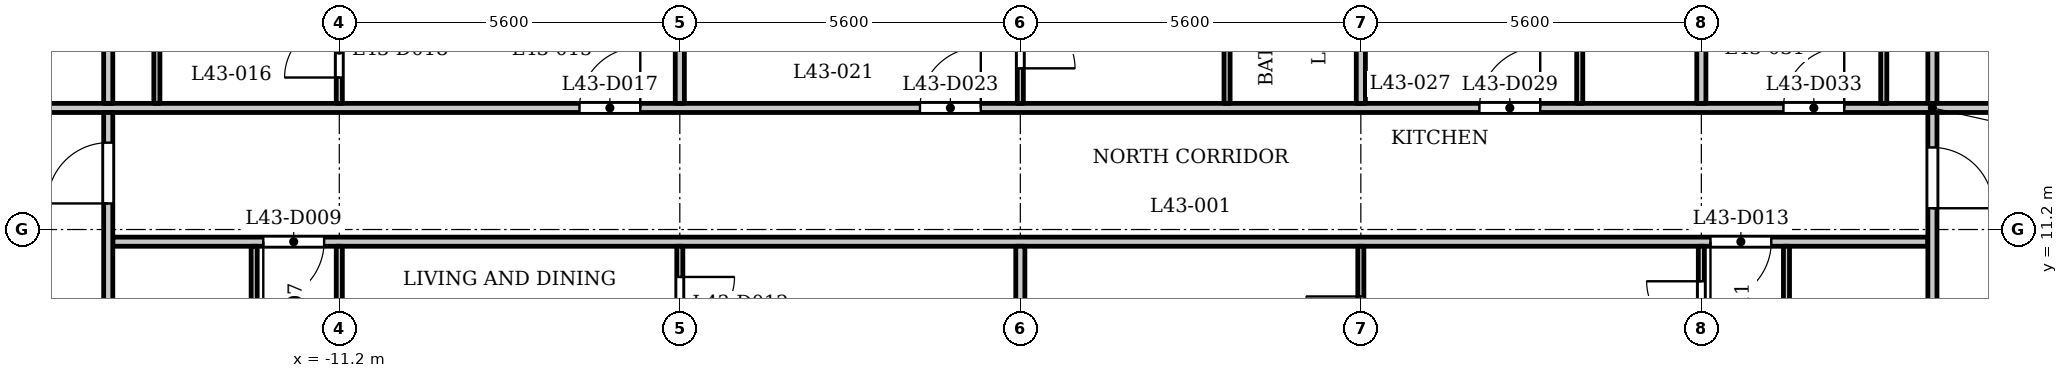
"""IFC4 building model, lengths in metres.
Left out: names, types, materials, properties, quantities, classifications, styles, units other than length and angle.
Written with IfcOpenShell. Run it as: python <this file> out.ifc"""

import sys

from ifc_helpers import new_model, si_unit, direction, frame, frame_2d, origin, place, context, subcontext, project, spatial, rectangle, extrude, element, fill, save


model = new_model("IFC4")
c1 = context("Model", 3, precision=1e-05, world=origin(), true_north=direction((0.0, 1.0)))
c2 = subcontext(c1, "Body", "Model", "MODEL_VIEW")
j1 = project(units=[si_unit("LENGTHUNIT", "METRE"), si_unit("PLANEANGLEUNIT", "RADIAN")], contexts=[c1])
p1 = place(None, origin())
s1 = spatial("IfcSite", under=j1, at=p1, CompositionType="ELEMENT")
p2 = place(p1, origin())
s2 = spatial("IfcBuilding", under=s1, at=p2, CompositionType="ELEMENT")
p3 = place(p2, frame((0.0, 0.0, 167.6)))
s3 = spatial("IfcBuildingStorey", under=s2, at=p3, CompositionType="ELEMENT", Elevation=167.6)
p4 = place(p3, frame((-14.925, 11.0, 0.0), z_axis=(0.0, 0.0, 1.0), x_axis=(1.0, 0.0, 0.0)))
e1 = element("IfcWall", 1, at=p4, inside=s3, PredefinedType="PARTITIONING", context=c2, shape_type="SweptSolid", body=[
    extrude(rectangle(XDim=29.85, YDim=0.15, at=frame_2d((14.925, 0.0))), origin(), (0.0, 0.0, 1.0), 3.2),
])
p5 = place(p4, frame((2.475, 0.0, 0.0)))
e2 = element("IfcOpeningElement", 2, at=p5, cuts=e1, PredefinedType="OPENING", context=c2, shape_type="SweptSolid", body=[
    extrude(rectangle(XDim=1.0, YDim=2.1, at=frame_2d((0.5, 1.05))), frame((0.0, 0.085, 0.0), z_axis=(0.0, -1.0, 0.0), x_axis=(1.0, 0.0, 0.0)), (0.0, 0.0, 1.0), 0.17),
])
p6 = place(p4, frame((26.275, 0.0, 0.0)))
e3 = element("IfcOpeningElement", 3, at=p6, cuts=e1, PredefinedType="OPENING", context=c2, shape_type="SweptSolid", body=[
    extrude(rectangle(XDim=1.0, YDim=2.1, at=frame_2d((0.5, 1.05))), frame((0.0, 0.085, 0.0), z_axis=(0.0, -1.0, 0.0), x_axis=(1.0, 0.0, 0.0)), (0.0, 0.0, 1.0), 0.17),
])
p7 = place(p3, frame((-17.4, 13.2, 0.0), z_axis=(0.0, 0.0, 1.0), x_axis=(1.0, 0.0, 0.0)))
e4 = element("IfcWall", 4, at=p7, inside=s3, PredefinedType="PARTITIONING", context=c2, shape_type="SweptSolid", body=[
    extrude(rectangle(XDim=34.8, YDim=0.15, at=frame_2d((17.4, 0.0))), origin(), (0.0, 0.0, 1.0), 3.2),
])
p8 = place(p7, frame((0.25, 0.0, 0.0)))
e5 = element("IfcOpeningElement", 5, at=p8, cuts=e4, PredefinedType="OPENING", context=c2, shape_type="SweptSolid", body=[
    extrude(rectangle(XDim=1.0, YDim=2.1, at=frame_2d((0.5, 1.05))), frame((0.0, 0.085, 0.0), z_axis=(0.0, -1.0, 0.0), x_axis=(1.0, 0.0, 0.0)), (0.0, 0.0, 1.0), 0.17),
])
p9 = place(p7, frame((33.65, 0.0, 0.0)))
e6 = element("IfcOpeningElement", 6, at=p9, cuts=e4, PredefinedType="OPENING", context=c2, shape_type="SweptSolid", body=[
    extrude(rectangle(XDim=1.0, YDim=2.1, at=frame_2d((0.5, 1.05))), frame((0.0, 0.085, 0.0), z_axis=(0.0, -1.0, 0.0), x_axis=(1.0, 0.0, 0.0)), (0.0, 0.0, 1.0), 0.17),
])
p10 = place(p7, frame((10.15, 0.0, 0.0)))
e7 = element("IfcOpeningElement", 7, at=p10, cuts=e4, PredefinedType="OPENING", context=c2, shape_type="SweptSolid", body=[
    extrude(rectangle(XDim=1.0, YDim=2.1, at=frame_2d((0.5, 1.05))), frame((0.0, 0.085, 0.0), z_axis=(0.0, -1.0, 0.0), x_axis=(1.0, 0.0, 0.0)), (0.0, 0.0, 1.0), 0.17),
])
p11 = place(p7, frame((15.75, 0.0, 0.0)))
e8 = element("IfcOpeningElement", 8, at=p11, cuts=e4, PredefinedType="OPENING", context=c2, shape_type="SweptSolid", body=[
    extrude(rectangle(XDim=1.0, YDim=2.1, at=frame_2d((0.5, 1.05))), frame((0.0, 0.085, 0.0), z_axis=(0.0, -1.0, 0.0), x_axis=(1.0, 0.0, 0.0)), (0.0, 0.0, 1.0), 0.17),
])
p12 = place(p7, frame((24.95, 0.0, 0.0)))
e9 = element("IfcOpeningElement", 9, at=p12, cuts=e4, PredefinedType="OPENING", context=c2, shape_type="SweptSolid", body=[
    extrude(rectangle(XDim=1.0, YDim=2.1, at=frame_2d((0.5, 1.05))), frame((0.0, 0.085, 0.0), z_axis=(0.0, -1.0, 0.0), x_axis=(1.0, 0.0, 0.0)), (0.0, 0.0, 1.0), 0.17),
])
p13 = place(p7, frame((29.95, 0.0, 0.0)))
e10 = element("IfcOpeningElement", 10, at=p13, cuts=e4, PredefinedType="OPENING", context=c2, shape_type="SweptSolid", body=[
    extrude(rectangle(XDim=1.0, YDim=2.1, at=frame_2d((0.5, 1.05))), frame((0.0, 0.085, 0.0), z_axis=(0.0, -1.0, 0.0), x_axis=(1.0, 0.0, 0.0)), (0.0, 0.0, 1.0), 0.17),
])
p14 = place(p3, frame((-15.0, 6.769, 0.0), z_axis=(0.0, 0.0, 1.0), x_axis=(0.0, 1.0, 0.0)))
e11 = element("IfcWall", 11, at=p14, inside=s3, PredefinedType="PARTITIONING", context=c2, shape_type="SweptSolid", body=[
    extrude(rectangle(XDim=6.356, YDim=0.15, at=frame_2d((3.178, 0.0))), origin(), (0.0, 0.0, 1.0), 3.2),
])
p15 = place(p14, frame((4.86, 0.0, 0.0)))
e12 = element("IfcOpeningElement", 12, at=p15, cuts=e11, PredefinedType="OPENING", context=c2, shape_type="SweptSolid", body=[
    extrude(rectangle(XDim=1.0, YDim=2.1, at=frame_2d((0.5, 1.05))), frame((0.0, 0.085, 0.0), z_axis=(0.0, -1.0, 0.0), x_axis=(1.0, 0.0, 0.0)), (0.0, 0.0, 1.0), 0.17),
])
p16 = place(p3, frame((-15.0, 13.275, 0.0), z_axis=(0.0, 0.0, 1.0), x_axis=(0.0, 1.0, 0.0)))
e13 = element("IfcWall", 13, at=p16, inside=s3, PredefinedType="PARTITIONING", context=c2, shape_type="SweptSolid", body=[
    extrude(rectangle(XDim=2.05, YDim=0.15, at=frame_2d((1.025, 0.0))), origin(), (0.0, 0.0, 1.0), 3.2),
])
p17 = place(p3, frame((-14.2, 13.275, 0.0), z_axis=(0.0, 0.0, 1.0), x_axis=(0.0, 1.0, 0.0)))
e14 = element("IfcWall", 14, at=p17, inside=s3, PredefinedType="PARTITIONING", context=c2, shape_type="SweptSolid", body=[
    extrude(rectangle(XDim=3.175, YDim=0.1, at=frame_2d((1.587, 0.0))), origin(), (0.0, 0.0, 1.0), 3.2),
])
p18 = place(p3, frame((-12.6, 7.32, 0.0), z_axis=(0.0, 0.0, 1.0), x_axis=(0.0, 1.0, 0.0)))
e15 = element("IfcWall", 15, at=p18, inside=s3, PredefinedType="PARTITIONING", context=c2, shape_type="SweptSolid", body=[
    extrude(rectangle(XDim=3.605, YDim=0.1, at=frame_2d((1.802, 0.0))), origin(), (0.0, 0.0, 1.0), 3.2),
])
p19 = place(p18, frame((1.729, 0.0, 0.0)))
e16 = element("IfcOpeningElement", 16, at=p19, cuts=e15, PredefinedType="OPENING", context=c2, shape_type="SweptSolid", body=[
    extrude(rectangle(XDim=0.8, YDim=2.1, at=frame_2d((0.4, 1.05))), frame((0.0, 0.06, 0.0), z_axis=(0.0, -1.0, 0.0), x_axis=(1.0, 0.0, 0.0)), (0.0, 0.0, 1.0), 0.12),
])
p20 = place(p3, frame((-11.2, 7.32, 0.0), z_axis=(0.0, 0.0, 1.0), x_axis=(0.0, 1.0, 0.0)))
e17 = element("IfcWall", 17, at=p20, inside=s3, PredefinedType="PARTITIONING", context=c2, shape_type="SweptSolid", body=[
    extrude(rectangle(XDim=3.605, YDim=0.1, at=frame_2d((1.802, 0.0))), origin(), (0.0, 0.0, 1.0), 3.2),
])
p21 = place(p20, frame((1.7, 0.0, 0.0)))
e18 = element("IfcOpeningElement", 18, at=p21, cuts=e17, PredefinedType="OPENING", context=c2, shape_type="SweptSolid", body=[
    extrude(rectangle(XDim=0.9, YDim=2.1, at=frame_2d((0.45, 1.05))), frame((0.0, 0.06, 0.0), z_axis=(0.0, -1.0, 0.0), x_axis=(1.0, 0.0, 0.0)), (0.0, 0.0, 1.0), 0.12),
])
p22 = place(p3, frame((-11.2, 13.275, 0.0), z_axis=(0.0, 0.0, 1.0), x_axis=(0.0, 1.0, 0.0)))
e19 = element("IfcWall", 19, at=p22, inside=s3, PredefinedType="PARTITIONING", context=c2, shape_type="SweptSolid", body=[
    extrude(rectangle(XDim=3.175, YDim=0.1, at=frame_2d((1.587, 0.0))), origin(), (0.0, 0.0, 1.0), 3.2),
])
p23 = place(p22, frame((0.425, 0.0, 0.0)))
e20 = element("IfcOpeningElement", 20, at=p23, cuts=e19, PredefinedType="OPENING", context=c2, shape_type="SweptSolid", body=[
    extrude(rectangle(XDim=0.9, YDim=2.1, at=frame_2d((0.45, 1.05))), frame((0.0, 0.06, 0.0), z_axis=(0.0, -1.0, 0.0), x_axis=(1.0, 0.0, 0.0)), (0.0, 0.0, 1.0), 0.12),
])
p24 = place(p3, frame((-5.6, 7.32, 0.0), z_axis=(0.0, 0.0, 1.0), x_axis=(0.0, 1.0, 0.0)))
e21 = element("IfcWall", 21, at=p24, inside=s3, PredefinedType="PARTITIONING", context=c2, shape_type="SweptSolid", body=[
    extrude(rectangle(XDim=3.605, YDim=0.1, at=frame_2d((1.802, 0.0))), origin(), (0.0, 0.0, 1.0), 3.2),
])
p25 = place(p24, frame((2.2, 0.0, 0.0)))
e22 = element("IfcOpeningElement", 22, at=p25, cuts=e21, PredefinedType="OPENING", context=c2, shape_type="SweptSolid", body=[
    extrude(rectangle(XDim=0.9, YDim=2.1, at=frame_2d((0.45, 1.05))), frame((0.0, 0.06, 0.0), z_axis=(0.0, -1.0, 0.0), x_axis=(1.0, 0.0, 0.0)), (0.0, 0.0, 1.0), 0.12),
])
p26 = place(p3, frame((-5.6, 13.275, 0.0), z_axis=(0.0, 0.0, 1.0), x_axis=(0.0, 1.0, 0.0)))
e23 = element("IfcWall", 23, at=p26, inside=s3, PredefinedType="PARTITIONING", context=c2, shape_type="SweptSolid", body=[
    extrude(rectangle(XDim=3.175, YDim=0.15, at=frame_2d((1.587, 0.0))), origin(), (0.0, 0.0, 1.0), 3.2),
])
p27 = place(p3, frame((0.0, 13.275, 0.0), z_axis=(0.0, 0.0, 1.0), x_axis=(0.0, 1.0, 0.0)))
e24 = element("IfcWall", 24, at=p27, inside=s3, PredefinedType="PARTITIONING", context=c2, shape_type="SweptSolid", body=[
    extrude(rectangle(XDim=3.175, YDim=0.1, at=frame_2d((1.587, 0.0))), origin(), (0.0, 0.0, 1.0), 3.2),
])
p28 = place(p27, frame((0.576, 0.0, 0.0)))
e25 = element("IfcOpeningElement", 25, at=p28, cuts=e24, PredefinedType="OPENING", context=c2, shape_type="SweptSolid", body=[
    extrude(rectangle(XDim=0.9, YDim=2.1, at=frame_2d((0.45, 1.05))), frame((0.0, 0.06, 0.0), z_axis=(0.0, -1.0, 0.0), x_axis=(1.0, 0.0, 0.0)), (0.0, 0.0, 1.0), 0.12),
])
p29 = place(p3, frame((0.0, 7.32, 0.0), z_axis=(0.0, 0.0, 1.0), x_axis=(0.0, 1.0, 0.0)))
e26 = element("IfcWall", 26, at=p29, inside=s3, PredefinedType="PARTITIONING", context=c2, shape_type="SweptSolid", body=[
    extrude(rectangle(XDim=3.605, YDim=0.15, at=frame_2d((1.802, 0.0))), origin(), (0.0, 0.0, 1.0), 3.2),
])
p30 = place(p3, frame((3.4, 13.275, 0.0), z_axis=(0.0, 0.0, 1.0), x_axis=(0.0, 1.0, 0.0)))
e27 = element("IfcWall", 27, at=p30, inside=s3, PredefinedType="PARTITIONING", context=c2, shape_type="SweptSolid", body=[
    extrude(rectangle(XDim=3.175, YDim=0.1, at=frame_2d((1.587, 0.0))), origin(), (0.0, 0.0, 1.0), 3.2),
])
p31 = place(p3, frame((5.6, 7.32, 0.0), z_axis=(0.0, 0.0, 1.0), x_axis=(0.0, 1.0, 0.0)))
e28 = element("IfcWall", 28, at=p31, inside=s3, PredefinedType="PARTITIONING", context=c2, shape_type="SweptSolid", body=[
    extrude(rectangle(XDim=3.605, YDim=0.1, at=frame_2d((1.802, 0.0))), origin(), (0.0, 0.0, 1.0), 3.2),
])
p32 = place(p31, frame((1.879, 0.0, 0.0)))
e29 = element("IfcOpeningElement", 29, at=p32, cuts=e28, PredefinedType="OPENING", context=c2, shape_type="SweptSolid", body=[
    extrude(rectangle(XDim=0.9, YDim=2.1, at=frame_2d((0.45, 1.05))), frame((0.0, 0.06, 0.0), z_axis=(0.0, -1.0, 0.0), x_axis=(1.0, 0.0, 0.0)), (0.0, 0.0, 1.0), 0.12),
])
p33 = place(p3, frame((5.6, 13.275, 0.0), z_axis=(0.0, 0.0, 1.0), x_axis=(0.0, 1.0, 0.0)))
e30 = element("IfcWall", 30, at=p33, inside=s3, PredefinedType="PARTITIONING", context=c2, shape_type="SweptSolid", body=[
    extrude(rectangle(XDim=3.175, YDim=0.15, at=frame_2d((1.587, 0.0))), origin(), (0.0, 0.0, 1.0), 3.2),
])
p34 = place(p3, frame((9.2, 13.275, 0.0), z_axis=(0.0, 0.0, 1.0), x_axis=(0.0, 1.0, 0.0)))
e31 = element("IfcWall", 31, at=p34, inside=s3, PredefinedType="PARTITIONING", context=c2, shape_type="SweptSolid", body=[
    extrude(rectangle(XDim=3.175, YDim=0.1, at=frame_2d((1.587, 0.0))), origin(), (0.0, 0.0, 1.0), 3.2),
])
p35 = place(p3, frame((11.2, 7.32, 0.0), z_axis=(0.0, 0.0, 1.0), x_axis=(0.0, 1.0, 0.0)))
e32 = element("IfcWall", 32, at=p35, inside=s3, PredefinedType="PARTITIONING", context=c2, shape_type="SweptSolid", body=[
    extrude(rectangle(XDim=3.605, YDim=0.1, at=frame_2d((1.802, 0.0))), origin(), (0.0, 0.0, 1.0), 3.2),
])
p36 = place(p35, frame((2.129, 0.0, 0.0)))
e33 = element("IfcOpeningElement", 33, at=p36, cuts=e32, PredefinedType="OPENING", context=c2, shape_type="SweptSolid", body=[
    extrude(rectangle(XDim=0.9, YDim=2.1, at=frame_2d((0.45, 1.05))), frame((0.0, 0.06, 0.0), z_axis=(0.0, -1.0, 0.0), x_axis=(1.0, 0.0, 0.0)), (0.0, 0.0, 1.0), 0.12),
])
p37 = place(p3, frame((11.2, 13.275, 0.0), z_axis=(0.0, 0.0, 1.0), x_axis=(0.0, 1.0, 0.0)))
e34 = element("IfcWall", 34, at=p37, inside=s3, PredefinedType="PARTITIONING", context=c2, shape_type="SweptSolid", body=[
    extrude(rectangle(XDim=3.175, YDim=0.15, at=frame_2d((1.587, 0.0))), origin(), (0.0, 0.0, 1.0), 3.2),
])
p38 = place(p3, frame((12.6, 7.32, 0.0), z_axis=(0.0, 0.0, 1.0), x_axis=(0.0, 1.0, 0.0)))
e35 = element("IfcWall", 35, at=p38, inside=s3, PredefinedType="PARTITIONING", context=c2, shape_type="SweptSolid", body=[
    extrude(rectangle(XDim=3.605, YDim=0.1, at=frame_2d((1.802, 0.0))), origin(), (0.0, 0.0, 1.0), 3.2),
])
p39 = place(p38, frame((1.7, 0.0, 0.0)))
e36 = element("IfcOpeningElement", 36, at=p39, cuts=e35, PredefinedType="OPENING", context=c2, shape_type="SweptSolid", body=[
    extrude(rectangle(XDim=0.8, YDim=2.1, at=frame_2d((0.4, 1.05))), frame((0.0, 0.06, 0.0), z_axis=(0.0, -1.0, 0.0), x_axis=(1.0, 0.0, 0.0)), (0.0, 0.0, 1.0), 0.12),
])
p40 = place(p3, frame((14.2, 13.275, 0.0), z_axis=(0.0, 0.0, 1.0), x_axis=(0.0, 1.0, 0.0)))
e37 = element("IfcWall", 37, at=p40, inside=s3, PredefinedType="PARTITIONING", context=c2, shape_type="SweptSolid", body=[
    extrude(rectangle(XDim=3.175, YDim=0.1, at=frame_2d((1.587, 0.0))), origin(), (0.0, 0.0, 1.0), 3.2),
])
p41 = place(p3, frame((15.0, 6.769, 0.0), z_axis=(0.0, 0.0, 1.0), x_axis=(0.0, 1.0, 0.0)))
e38 = element("IfcWall", 38, at=p41, inside=s3, PredefinedType="PARTITIONING", context=c2, shape_type="SweptSolid", body=[
    extrude(rectangle(XDim=6.356, YDim=0.15, at=frame_2d((3.178, 0.0))), origin(), (0.0, 0.0, 1.0), 3.2),
])
p42 = place(p41, frame((4.781, 0.0, 0.0)))
e39 = element("IfcOpeningElement", 39, at=p42, cuts=e38, PredefinedType="OPENING", context=c2, shape_type="SweptSolid", body=[
    extrude(rectangle(XDim=1.0, YDim=2.1, at=frame_2d((0.5, 1.05))), frame((0.0, 0.085, 0.0), z_axis=(0.0, -1.0, 0.0), x_axis=(1.0, 0.0, 0.0)), (0.0, 0.0, 1.0), 0.17),
])
p43 = place(p3, frame((15.0, 13.275, 0.0), z_axis=(0.0, 0.0, 1.0), x_axis=(0.0, 1.0, 0.0)))
e40 = element("IfcWall", 40, at=p43, inside=s3, PredefinedType="PARTITIONING", context=c2, shape_type="SweptSolid", body=[
    extrude(rectangle(XDim=2.05, YDim=0.15, at=frame_2d((1.025, 0.0))), origin(), (0.0, 0.0, 1.0), 3.2),
])
p44 = place(p15, origin())
e41 = element("IfcDoor", 41, at=p44, inside=s3, OperationType="SINGLE_SWING_RIGHT", PredefinedType="DOOR", context=c2, shape_type="SweptSolid", body=[
    extrude(rectangle(XDim=1.0, YDim=2.1, at=frame_2d((0.5, 1.05))), frame((0.0, 0.025, 0.0), z_axis=(0.0, -1.0, 0.0), x_axis=(1.0, 0.0, 0.0)), (0.0, 0.0, 1.0), 0.05),
])
fill(e12, e41)
p45 = place(p42, origin())
e42 = element("IfcDoor", 42, at=p45, inside=s3, OperationType="SINGLE_SWING_LEFT", PredefinedType="DOOR", context=c2, shape_type="SweptSolid", body=[
    extrude(rectangle(XDim=1.0, YDim=2.1, at=frame_2d((0.5, 1.05))), frame((0.0, 0.025, 0.0), z_axis=(0.0, -1.0, 0.0), x_axis=(1.0, 0.0, 0.0)), (0.0, 0.0, 1.0), 0.05),
])
fill(e39, e42)
p46 = place(p5, origin())
e43 = element("IfcDoor", 43, at=p46, inside=s3, OperationType="SINGLE_SWING_LEFT", PredefinedType="DOOR", context=c2, shape_type="SweptSolid", body=[
    extrude(rectangle(XDim=1.0, YDim=2.1, at=frame_2d((0.5, 1.05))), frame((0.0, 0.025, 0.0), z_axis=(0.0, -1.0, 0.0), x_axis=(1.0, 0.0, 0.0)), (0.0, 0.0, 1.0), 0.05),
])
fill(e2, e43)
p47 = place(p25, origin())
e44 = element("IfcDoor", 44, at=p47, inside=s3, OperationType="SINGLE_SWING_RIGHT", PredefinedType="DOOR", context=c2, shape_type="SweptSolid", body=[
    extrude(rectangle(XDim=0.9, YDim=2.1, at=frame_2d((0.45, 1.05))), frame((0.0, 0.025, 0.0), z_axis=(0.0, -1.0, 0.0), x_axis=(1.0, 0.0, 0.0)), (0.0, 0.0, 1.0), 0.05),
])
fill(e22, e44)
p48 = place(p6, origin())
e45 = element("IfcDoor", 45, at=p48, inside=s3, OperationType="SINGLE_SWING_LEFT", PredefinedType="DOOR", context=c2, shape_type="SweptSolid", body=[
    extrude(rectangle(XDim=1.0, YDim=2.1, at=frame_2d((0.5, 1.05))), frame((0.0, 0.025, 0.0), z_axis=(0.0, -1.0, 0.0), x_axis=(1.0, 0.0, 0.0)), (0.0, 0.0, 1.0), 0.05),
])
fill(e3, e45)
p49 = place(p36, origin())
e46 = element("IfcDoor", 46, at=p49, inside=s3, OperationType="SINGLE_SWING_LEFT", PredefinedType="DOOR", context=c2, shape_type="SweptSolid", body=[
    extrude(rectangle(XDim=0.9, YDim=2.1, at=frame_2d((0.45, 1.05))), frame((0.0, 0.025, 0.0), z_axis=(0.0, -1.0, 0.0), x_axis=(1.0, 0.0, 0.0)), (0.0, 0.0, 1.0), 0.05),
])
fill(e33, e46)
p50 = place(p32, origin())
e47 = element("IfcDoor", 47, at=p50, inside=s3, OperationType="SINGLE_SWING_LEFT", PredefinedType="DOOR", context=c2, shape_type="SweptSolid", body=[
    extrude(rectangle(XDim=0.9, YDim=2.1, at=frame_2d((0.45, 1.05))), frame((0.0, 0.025, 0.0), z_axis=(0.0, -1.0, 0.0), x_axis=(1.0, 0.0, 0.0)), (0.0, 0.0, 1.0), 0.05),
])
fill(e29, e47)
p51 = place(p10, origin())
e48 = element("IfcDoor", 48, at=p51, inside=s3, OperationType="SINGLE_SWING_LEFT", PredefinedType="DOOR", context=c2, shape_type="SweptSolid", body=[
    extrude(rectangle(XDim=1.0, YDim=2.1, at=frame_2d((0.5, 1.05))), frame((0.0, 0.025, 0.0), z_axis=(0.0, -1.0, 0.0), x_axis=(1.0, 0.0, 0.0)), (0.0, 0.0, 1.0), 0.05),
])
fill(e7, e48)
p52 = place(p23, origin())
e49 = element("IfcDoor", 49, at=p52, inside=s3, OperationType="SINGLE_SWING_RIGHT", PredefinedType="DOOR", context=c2, shape_type="SweptSolid", body=[
    extrude(rectangle(XDim=0.9, YDim=2.1, at=frame_2d((0.45, 1.05))), frame((0.0, 0.025, 0.0), z_axis=(0.0, -1.0, 0.0), x_axis=(1.0, 0.0, 0.0)), (0.0, 0.0, 1.0), 0.05),
])
fill(e20, e49)
p53 = place(p11, origin())
e50 = element("IfcDoor", 50, at=p53, inside=s3, OperationType="SINGLE_SWING_LEFT", PredefinedType="DOOR", context=c2, shape_type="SweptSolid", body=[
    extrude(rectangle(XDim=1.0, YDim=2.1, at=frame_2d((0.5, 1.05))), frame((0.0, 0.025, 0.0), z_axis=(0.0, -1.0, 0.0), x_axis=(1.0, 0.0, 0.0)), (0.0, 0.0, 1.0), 0.05),
])
fill(e8, e50)
p54 = place(p28, origin())
e51 = element("IfcDoor", 51, at=p54, inside=s3, OperationType="SINGLE_SWING_LEFT", PredefinedType="DOOR", context=c2, shape_type="SweptSolid", body=[
    extrude(rectangle(XDim=0.9, YDim=2.1, at=frame_2d((0.45, 1.05))), frame((0.0, 0.025, 0.0), z_axis=(0.0, -1.0, 0.0), x_axis=(1.0, 0.0, 0.0)), (0.0, 0.0, 1.0), 0.05),
])
fill(e25, e51)
p55 = place(p12, origin())
e52 = element("IfcDoor", 52, at=p55, inside=s3, OperationType="SINGLE_SWING_LEFT", PredefinedType="DOOR", context=c2, shape_type="SweptSolid", body=[
    extrude(rectangle(XDim=1.0, YDim=2.1, at=frame_2d((0.5, 1.05))), frame((0.0, 0.025, 0.0), z_axis=(0.0, -1.0, 0.0), x_axis=(1.0, 0.0, 0.0)), (0.0, 0.0, 1.0), 0.05),
])
fill(e9, e52)
p56 = place(p13, origin())
e53 = element("IfcDoor", 53, at=p56, inside=s3, OperationType="SINGLE_SWING_LEFT", PredefinedType="DOOR", context=c2, shape_type="SweptSolid", body=[
    extrude(rectangle(XDim=1.0, YDim=2.1, at=frame_2d((0.5, 1.05))), frame((0.0, 0.025, 0.0), z_axis=(0.0, -1.0, 0.0), x_axis=(1.0, 0.0, 0.0)), (0.0, 0.0, 1.0), 0.05),
])
fill(e10, e53)
save(model, sys.argv[1])
